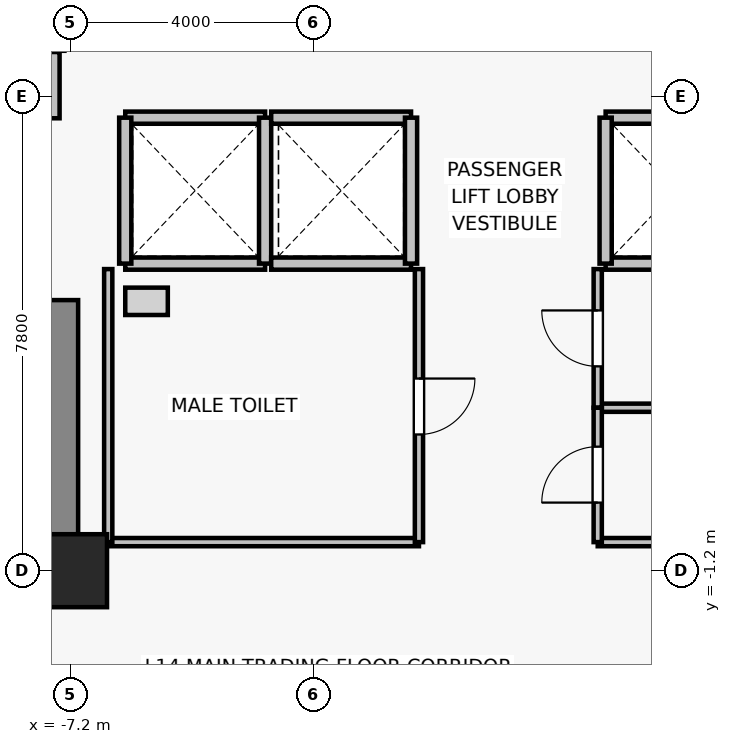
"""IFC4 building model, lengths in metres.
Left out: names, types, materials, properties, quantities, classifications, styles, units other than length and angle.
Written with IfcOpenShell. Run it as: python <this file> out.ifc"""

import sys

from ifc_helpers import new_model, si_unit, direction, frame, frame_2d, origin, origin_2d, place, context, subcontext, project, spatial, rectangle, extrude, source, transform, mapped, element, fill, save


model = new_model("IFC4")
c1 = context("Model", 3, precision=1e-05, world=origin(), true_north=direction((0.0, 1.0)))
c2 = subcontext(c1, "Body", "Model", "MODEL_VIEW")
j1 = project(units=[si_unit("LENGTHUNIT", "METRE"), si_unit("PLANEANGLEUNIT", "RADIAN")], contexts=[c1])
p1 = place(None, origin())
s1 = spatial("IfcSite", under=j1, at=p1, CompositionType="ELEMENT")
p2 = place(p1, origin())
s2 = spatial("IfcBuilding", under=s1, at=p2, CompositionType="ELEMENT")
p3 = place(p2, frame((0.0, 0.0, 53.8)))
s3 = spatial("IfcBuildingStorey", under=s2, at=p3, CompositionType="ELEMENT", Elevation=53.8)
p4 = place(p3, frame((-7.2, -1.2, 0.0), z_axis=(0.0, 0.0, 1.0), x_axis=(1.0, 0.0, 0.0)))
e1 = element("IfcColumn", 1, at=p4, inside=s3, PredefinedType="COLUMN", context=c2, shape_type="SweptSolid", body=[
    extrude(rectangle(XDim=1.2, YDim=1.2, at=origin_2d()), origin(), (0.0, 0.0, 1.0), 3.3),
])
p5 = place(p3, frame((-7.4, -0.75, 0.0), z_axis=(0.0, 0.0, 1.0), x_axis=(0.0, 1.0, 0.0)))
e2 = element("IfcWall", 2, at=p5, inside=s3, PredefinedType="SHEAR", context=c2, shape_type="SweptSolid", body=[
    extrude(rectangle(XDim=4.0, YDim=0.65, at=frame_2d((2.0, 0.0))), origin(), (0.0, 0.0, 1.0), 3.075),
])
for number, where, z_axis, x_axis in (
    (3, (-4.0, 3.85, 0.0), (0.0, 0.0, 1.0), (-1.0, 0.0, 0.0)),
    (4, (-6.3, 6.25, 0.0), (0.0, 0.0, 1.0), (1.0, 0.0, 0.0)),
):
    element("IfcWall", number, at=place(p3, frame(where, z_axis=z_axis, x_axis=x_axis)), inside=s3, PredefinedType="SOLIDWALL", context=c2, shape_type="SweptSolid", body=[
        extrude(rectangle(XDim=2.3, YDim=0.2, at=frame_2d((1.15, 0.0))), origin(), (0.0, 0.0, 1.0), 3.075),
    ])
for number, where, z_axis, x_axis in (
    (5, (-6.3, 3.85, 0.0), (0.0, 0.0, 1.0), (0.0, 1.0, 0.0)),
    (6, (-4.0, 6.25, 0.0), (0.0, 0.0, 1.0), (0.0, -1.0, 0.0)),
):
    element("IfcWall", number, at=place(p3, frame(where, z_axis=z_axis, x_axis=x_axis)), inside=s3, PredefinedType="SOLIDWALL", context=c2, shape_type="SweptSolid", body=[
        extrude(rectangle(XDim=2.4, YDim=0.2, at=frame_2d((1.2, 0.0))), origin(), (0.0, 0.0, 1.0), 3.075),
    ])
for number, where, z_axis, x_axis in (
    (7, (-1.6, 3.85, 0.0), (0.0, 0.0, 1.0), (-1.0, 0.0, 0.0)),
    (8, (-3.9, 6.25, 0.0), (0.0, 0.0, 1.0), (1.0, 0.0, 0.0)),
):
    element("IfcWall", number, at=place(p3, frame(where, z_axis=z_axis, x_axis=x_axis)), inside=s3, PredefinedType="SOLIDWALL", context=c2, shape_type="SweptSolid", body=[
        extrude(rectangle(XDim=2.3, YDim=0.2, at=frame_2d((1.15, 0.0))), origin(), (0.0, 0.0, 1.0), 3.075),
    ])
p6 = place(p3, frame((-1.6, 6.25, 0.0), z_axis=(0.0, 0.0, 1.0), x_axis=(0.0, -1.0, 0.0)))
e9 = element("IfcWall", 9, at=p6, inside=s3, PredefinedType="SOLIDWALL", context=c2, shape_type="SweptSolid", body=[
    extrude(rectangle(XDim=2.4, YDim=0.2, at=frame_2d((1.2, 0.0))), origin(), (0.0, 0.0, 1.0), 3.075),
])
for number, where, z_axis, x_axis in (
    (10, (3.9, 3.85, 0.0), (0.0, 0.0, 1.0), (-1.0, 0.0, 0.0)),
    (11, (1.6, 6.25, 0.0), (0.0, 0.0, 1.0), (1.0, 0.0, 0.0)),
):
    element("IfcWall", number, at=place(p3, frame(where, z_axis=z_axis, x_axis=x_axis)), inside=s3, PredefinedType="SOLIDWALL", context=c2, shape_type="SweptSolid", body=[
        extrude(rectangle(XDim=2.3, YDim=0.2, at=frame_2d((1.15, 0.0))), origin(), (0.0, 0.0, 1.0), 3.075),
    ])
p7 = place(p3, frame((1.6, 3.85, 0.0), z_axis=(0.0, 0.0, 1.0), x_axis=(0.0, 1.0, 0.0)))
e12 = element("IfcWall", 12, at=p7, inside=s3, PredefinedType="SOLIDWALL", context=c2, shape_type="SweptSolid", body=[
    extrude(rectangle(XDim=2.4, YDim=0.2, at=frame_2d((1.2, 0.0))), origin(), (0.0, 0.0, 1.0), 3.075),
])
p8 = place(p3, frame((-7.4, 7.35, 0.0), z_axis=(0.0, 0.0, 1.0), x_axis=(-1.0, 0.0, 0.0)))
e13 = element("IfcWall", 13, at=p8, inside=s3, PredefinedType="SOLIDWALL", context=c2, shape_type="SweptSolid", body=[
    extrude(rectangle(XDim=2.2, YDim=0.2, at=frame_2d((1.1, 0.0))), origin(), (0.0, 0.0, 1.0), 2.465),
])
p9 = place(p3, frame((-7.47, 7.33, 0.0), z_axis=(0.0, 0.0, 1.0), x_axis=(0.0, -1.0, 0.0)))
e14 = element("IfcWall", 14, at=p9, inside=s3, PredefinedType="PARTITIONING", context=c2, shape_type="SweptSolid", body=[
    extrude(rectangle(XDim=1.09, YDim=0.18, at=frame_2d((0.545, 0.0))), origin(), (0.0, 0.0, 1.0), 2.465),
])
p10 = place(p3, frame((-1.47, -0.73, 0.0), z_axis=(0.0, 0.0, 1.0), x_axis=(-1.0, 0.0, 0.0)))
e15 = element("IfcWall", 15, at=p10, inside=s3, PredefinedType="PARTITIONING", context=c2, shape_type="SweptSolid", body=[
    extrude(rectangle(XDim=5.11, YDim=0.135, at=frame_2d((2.555, 0.0))), origin(), (0.0, 0.0, 1.0), 3.075),
])
p11 = place(p3, frame((-6.58, -0.73, 0.0), z_axis=(0.0, 0.0, 1.0), x_axis=(0.0, 1.0, 0.0)))
e16 = element("IfcWall", 16, at=p11, inside=s3, PredefinedType="PARTITIONING", context=c2, shape_type="SweptSolid", body=[
    extrude(rectangle(XDim=4.49, YDim=0.135, at=frame_2d((2.245, 0.0))), origin(), (0.0, 0.0, 1.0), 3.075),
])
p12 = place(p3, frame((-1.47, 3.76, 0.0), z_axis=(0.0, 0.0, 1.0), x_axis=(0.0, -1.0, 0.0)))
e17 = element("IfcWall", 17, at=p12, inside=s3, PredefinedType="PARTITIONING", context=c2, shape_type="SweptSolid", body=[
    extrude(rectangle(XDim=4.49, YDim=0.135, at=frame_2d((2.245, 0.0))), origin(), (0.0, 0.0, 1.0), 3.075),
])
p13 = place(p12, frame((1.8, 0.0, 0.0)))
e18 = element("IfcOpeningElement", 18, at=p13, cuts=e17, PredefinedType="OPENING", context=c2, shape_type="SweptSolid", body=[
    extrude(rectangle(XDim=0.92, YDim=2.1, at=frame_2d((0.46, 1.05))), frame((0.0, 0.077, 0.0), z_axis=(0.0, -1.0, 0.0), x_axis=(1.0, 0.0, 0.0)), (0.0, 0.0, 1.0), 0.155),
])
p14 = place(p3, frame((6.58, 1.48, 0.0), z_axis=(0.0, 0.0, 1.0), x_axis=(-1.0, 0.0, 0.0)))
e19 = element("IfcWall", 19, at=p14, inside=s3, PredefinedType="PARTITIONING", context=c2, shape_type="SweptSolid", body=[
    extrude(rectangle(XDim=5.11, YDim=0.135, at=frame_2d((2.555, 0.0))), origin(), (0.0, 0.0, 1.0), 3.075),
])
p15 = place(p3, frame((1.47, 1.48, 0.0), z_axis=(0.0, 0.0, 1.0), x_axis=(0.0, 1.0, 0.0)))
e20 = element("IfcWall", 20, at=p15, inside=s3, PredefinedType="PARTITIONING", context=c2, shape_type="SweptSolid", body=[
    extrude(rectangle(XDim=2.28, YDim=0.135, at=frame_2d((1.14, 0.0))), origin(), (0.0, 0.0, 1.0), 3.075),
])
p16 = place(p15, frame((0.68, 0.0, 0.0)))
e21 = element("IfcOpeningElement", 21, at=p16, cuts=e20, PredefinedType="OPENING", context=c2, shape_type="SweptSolid", body=[
    extrude(rectangle(XDim=0.92, YDim=2.1, at=frame_2d((0.46, 1.05))), frame((0.0, 0.077, 0.0), z_axis=(0.0, -1.0, 0.0), x_axis=(1.0, 0.0, 0.0)), (0.0, 0.0, 1.0), 0.155),
])
p17 = place(p3, frame((4.18, -0.73, 0.0), z_axis=(0.0, 0.0, 1.0), x_axis=(-1.0, 0.0, 0.0)))
e22 = element("IfcWall", 22, at=p17, inside=s3, PredefinedType="PARTITIONING", context=c2, shape_type="SweptSolid", body=[
    extrude(rectangle(XDim=2.71, YDim=0.135, at=frame_2d((1.355, 0.0))), origin(), (0.0, 0.0, 1.0), 3.075),
])
p18 = place(p3, frame((1.47, -0.73, 0.0), z_axis=(0.0, 0.0, 1.0), x_axis=(0.0, 1.0, 0.0)))
e23 = element("IfcWall", 23, at=p18, inside=s3, PredefinedType="PARTITIONING", context=c2, shape_type="SweptSolid", body=[
    extrude(rectangle(XDim=2.21, YDim=0.135, at=frame_2d((1.105, 0.0))), origin(), (0.0, 0.0, 1.0), 3.075),
])
p19 = place(p18, frame((0.65, 0.0, 0.0)))
e24 = element("IfcOpeningElement", 24, at=p19, cuts=e23, PredefinedType="OPENING", context=c2, shape_type="SweptSolid", body=[
    extrude(rectangle(XDim=0.92, YDim=2.1, at=frame_2d((0.46, 1.05))), frame((0.0, 0.077, 0.0), z_axis=(0.0, -1.0, 0.0), x_axis=(1.0, 0.0, 0.0)), (0.0, 0.0, 1.0), 0.155),
])
m1 = source(origin(), c2, "Body", "SweptSolid", [
    extrude(rectangle(XDim=0.92, YDim=2.1, at=frame_2d((0.46, 1.05))), frame((0.0, 0.025, 0.0), z_axis=(0.0, -1.0, 0.0), x_axis=(1.0, 0.0, 0.0)), (0.0, 0.0, 1.0), 0.05),
])
p20 = place(p13, origin())
e25 = element("IfcDoor", 25, at=p20, inside=s3, OperationType="SINGLE_SWING_LEFT", PredefinedType="DOOR", context=c2, shape_type="MappedRepresentation", body=[
    mapped(m1, transform((0.0, 0.0, 0.0), x_axis=(1.0, 0.0, 0.0), y_axis=(0.0, 1.0, 0.0), z_axis=(0.0, 0.0, 1.0), scale=1.0)),
])
fill(e18, e25)
p21 = place(p16, origin())
e26 = element("IfcDoor", 26, at=p21, inside=s3, OperationType="SINGLE_SWING_RIGHT", PredefinedType="DOOR", context=c2, shape_type="MappedRepresentation", body=[
    mapped(m1, transform((0.0, 0.0, 0.0), x_axis=(1.0, 0.0, 0.0), y_axis=(0.0, 1.0, 0.0), z_axis=(0.0, 0.0, 1.0), scale=1.0)),
])
fill(e21, e26)
p22 = place(p19, origin())
e27 = element("IfcDoor", 27, at=p22, inside=s3, OperationType="SINGLE_SWING_LEFT", PredefinedType="DOOR", context=c2, shape_type="MappedRepresentation", body=[
    mapped(m1, transform((0.0, 0.0, 0.0), x_axis=(1.0, 0.0, 0.0), y_axis=(0.0, 1.0, 0.0), z_axis=(0.0, 0.0, 1.0), scale=1.0)),
])
fill(e24, e27)
save(model, sys.argv[1])
